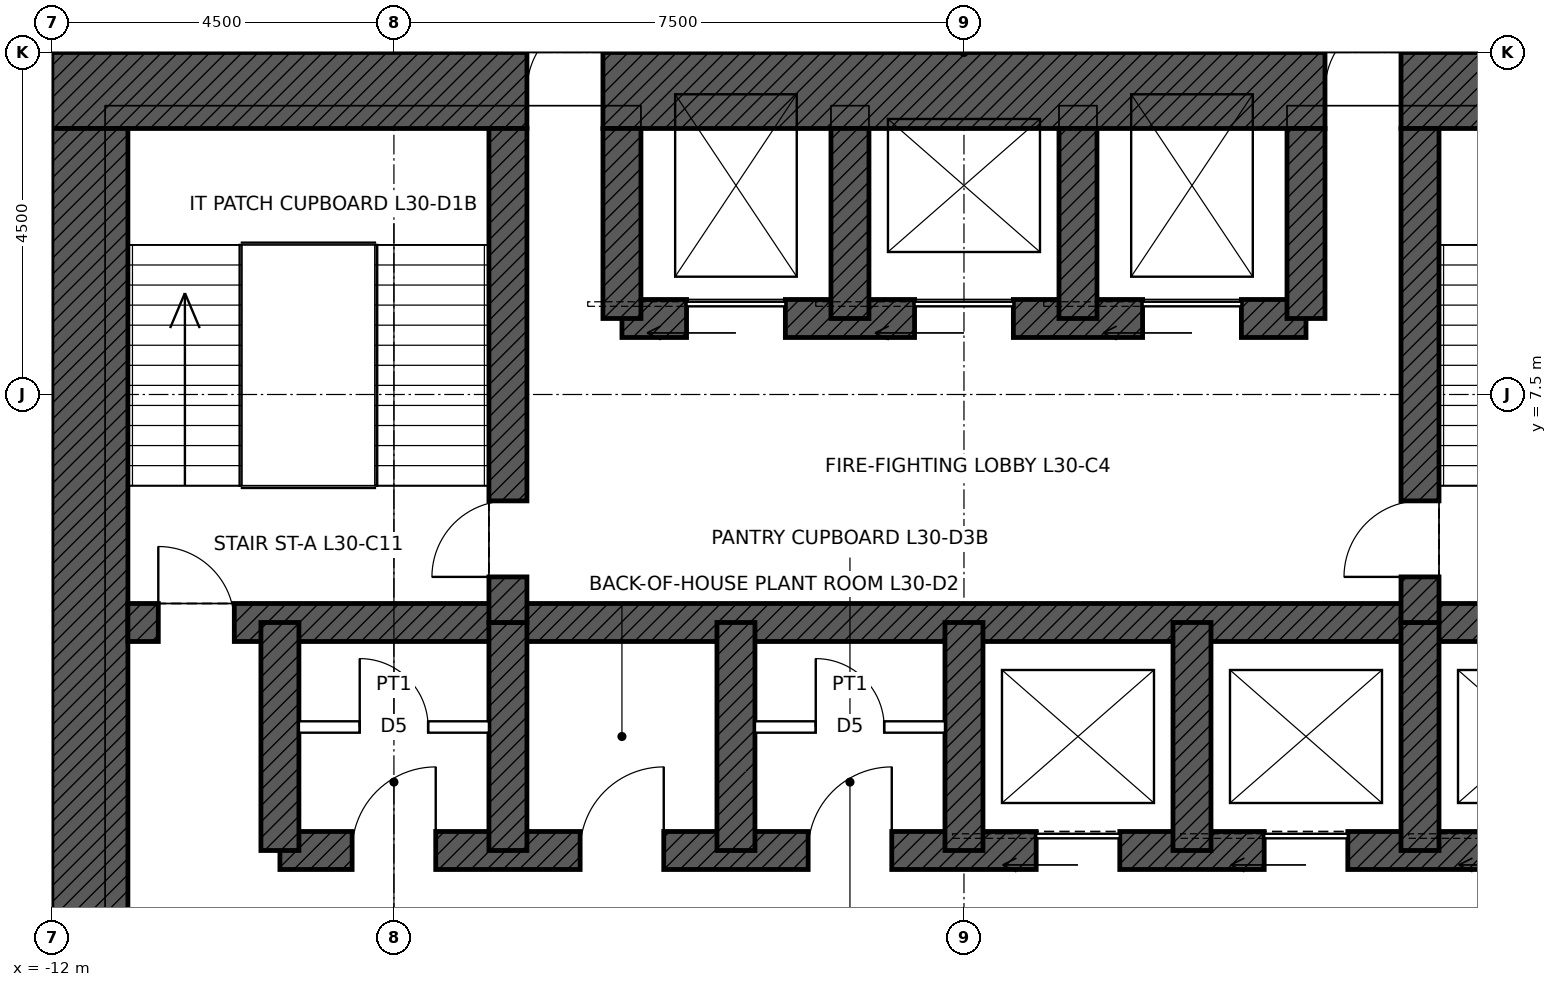
"""IFC4 building model, lengths in metres.
Left out: names, types, materials, properties, quantities, classifications, styles, units other than length and angle.
Written with IfcOpenShell. Run it as: python <this file> out.ifc"""

import sys

from ifc_helpers import new_model, si_unit, direction, frame, frame_2d, origin, place, context, subcontext, project, spatial, rectangle, extrude, element, fill, save


model = new_model("IFC4")
c1 = context("Model", 3, precision=1e-05, world=origin(), true_north=direction((0.0, 1.0)))
c2 = subcontext(c1, "Body", "Model", "MODEL_VIEW")
j1 = project(units=[si_unit("LENGTHUNIT", "METRE"), si_unit("PLANEANGLEUNIT", "RADIAN")], contexts=[c1])
p1 = place(None, origin())
s1 = spatial("IfcSite", under=j1, at=p1, CompositionType="ELEMENT")
p2 = place(p1, origin())
s2 = spatial("IfcBuilding", under=s1, at=p2, CompositionType="ELEMENT")
p3 = place(p2, frame((0.0, 0.0, 149.4)))
s3 = spatial("IfcBuildingStorey", under=s2, at=p3, CompositionType="ELEMENT", Elevation=149.4)
p4 = place(p3, frame((-12.0, 11.5, 0.0), z_axis=(0.0, 0.0, 1.0), x_axis=(1.0, 0.0, 0.0)))
e1 = element("IfcWall", 1, at=p4, inside=s3, PredefinedType="SHEAR", context=c2, shape_type="SweptSolid", body=[
    extrude(rectangle(XDim=24.0, YDim=1.0, at=frame_2d((12.0, 0.0))), origin(), (0.0, 0.0, 1.0), 4.5),
])
p5 = place(p4, frame((6.25, 0.0, 0.0)))
e2 = element("IfcOpeningElement", 2, at=p5, cuts=e1, PredefinedType="OPENING", context=c2, shape_type="SweptSolid", body=[
    extrude(rectangle(XDim=1.0, YDim=2.4, at=frame_2d((0.5, 1.2))), frame((0.0, 0.51, 0.0), z_axis=(0.0, -1.0, 0.0), x_axis=(1.0, 0.0, 0.0)), (0.0, 0.0, 1.0), 1.02),
])
p6 = place(p4, frame((16.75, 0.0, 0.0)))
e3 = element("IfcOpeningElement", 3, at=p6, cuts=e1, PredefinedType="OPENING", context=c2, shape_type="SweptSolid", body=[
    extrude(rectangle(XDim=1.0, YDim=2.4, at=frame_2d((0.5, 1.2))), frame((0.0, 0.51, 0.0), z_axis=(0.0, -1.0, 0.0), x_axis=(1.0, 0.0, 0.0)), (0.0, 0.0, 1.0), 1.02),
])
p7 = place(p3, frame((-11.5, -11.0, 0.0), z_axis=(0.0, 0.0, 1.0), x_axis=(0.0, 1.0, 0.0)))
e4 = element("IfcWall", 4, at=p7, inside=s3, PredefinedType="SHEAR", context=c2, shape_type="SweptSolid", body=[
    extrude(rectangle(XDim=22.0, YDim=1.0, at=frame_2d((11.0, 0.0))), origin(), (0.0, 0.0, 1.0), 4.5),
])
p8 = place(p7, frame((10.5, 0.0, 0.0)))
e5 = element("IfcOpeningElement", 5, at=p8, cuts=e4, PredefinedType="OPENING", context=c2, shape_type="SweptSolid", body=[
    extrude(rectangle(XDim=1.0, YDim=2.4, at=frame_2d((0.5, 1.2))), frame((0.0, 0.51, 0.0), z_axis=(0.0, -1.0, 0.0), x_axis=(1.0, 0.0, 0.0)), (0.0, 0.0, 1.0), 1.02),
])
p9 = place(p3, frame((-11.0, 4.5, 0.0), z_axis=(0.0, 0.0, 1.0), x_axis=(1.0, 0.0, 0.0)))
e6 = element("IfcWall", 6, at=p9, inside=s3, PredefinedType="SHEAR", context=c2, shape_type="SweptSolid", body=[
    extrude(rectangle(XDim=22.0, YDim=0.5, at=frame_2d((11.0, 0.0))), origin(), (0.0, 0.0, 1.0), 4.5),
])
p10 = place(p9, frame((0.4, 0.0, 0.0)))
e7 = element("IfcOpeningElement", 7, at=p10, cuts=e6, PredefinedType="OPENING", context=c2, shape_type="SweptSolid", body=[
    extrude(rectangle(XDim=1.0, YDim=2.1, at=frame_2d((0.5, 1.05))), frame((0.0, 0.26, 0.0), z_axis=(0.0, -1.0, 0.0), x_axis=(1.0, 0.0, 0.0)), (0.0, 0.0, 1.0), 0.52),
])
p11 = place(p9, frame((20.6, 0.0, 0.0)))
e8 = element("IfcOpeningElement", 8, at=p11, cuts=e6, PredefinedType="OPENING", context=c2, shape_type="SweptSolid", body=[
    extrude(rectangle(XDim=1.0, YDim=2.1, at=frame_2d((0.5, 1.05))), frame((0.0, 0.26, 0.0), z_axis=(0.0, -1.0, 0.0), x_axis=(1.0, 0.0, 0.0)), (0.0, 0.0, 1.0), 0.52),
])
p12 = place(p3, frame((-9.0, 1.5, 0.0), z_axis=(0.0, 0.0, 1.0), x_axis=(1.0, 0.0, 0.0)))
e9 = element("IfcWall", 9, at=p12, inside=s3, PredefinedType="SHEAR", context=c2, shape_type="SweptSolid", body=[
    extrude(rectangle(XDim=18.0, YDim=0.5, at=frame_2d((9.0, 0.0))), origin(), (0.0, 0.0, 1.0), 4.5),
])
p13 = place(p12, frame((9.95, 0.0, 0.0)))
e10 = element("IfcOpeningElement", 10, at=p13, cuts=e9, PredefinedType="OPENING", context=c2, shape_type="SweptSolid", body=[
    extrude(rectangle(XDim=1.1, YDim=2.1, at=frame_2d((0.55, 1.05))), frame((0.0, 0.26, 0.0), z_axis=(0.0, -1.0, 0.0), x_axis=(1.0, 0.0, 0.0)), (0.0, 0.0, 1.0), 0.52),
])
p14 = place(p12, frame((12.95, 0.0, 0.0)))
e11 = element("IfcOpeningElement", 11, at=p14, cuts=e9, PredefinedType="OPENING", context=c2, shape_type="SweptSolid", body=[
    extrude(rectangle(XDim=1.1, YDim=2.1, at=frame_2d((0.55, 1.05))), frame((0.0, 0.26, 0.0), z_axis=(0.0, -1.0, 0.0), x_axis=(1.0, 0.0, 0.0)), (0.0, 0.0, 1.0), 0.52),
])
p15 = place(p12, frame((15.95, 0.0, 0.0)))
e12 = element("IfcOpeningElement", 12, at=p15, cuts=e9, PredefinedType="OPENING", context=c2, shape_type="SweptSolid", body=[
    extrude(rectangle(XDim=1.1, YDim=2.1, at=frame_2d((0.55, 1.05))), frame((0.0, 0.26, 0.0), z_axis=(0.0, -1.0, 0.0), x_axis=(1.0, 0.0, 0.0)), (0.0, 0.0, 1.0), 0.52),
])
p16 = place(p12, frame((0.95, 0.0, 0.0)))
e13 = element("IfcOpeningElement", 13, at=p16, cuts=e9, PredefinedType="OPENING", context=c2, shape_type="SweptSolid", body=[
    extrude(rectangle(XDim=1.1, YDim=2.1, at=frame_2d((0.55, 1.05))), frame((0.0, 0.26, 0.0), z_axis=(0.0, -1.0, 0.0), x_axis=(1.0, 0.0, 0.0)), (0.0, 0.0, 1.0), 0.52),
])
p17 = place(p12, frame((3.95, 0.0, 0.0)))
e14 = element("IfcOpeningElement", 14, at=p17, cuts=e9, PredefinedType="OPENING", context=c2, shape_type="SweptSolid", body=[
    extrude(rectangle(XDim=1.1, YDim=2.1, at=frame_2d((0.55, 1.05))), frame((0.0, 0.26, 0.0), z_axis=(0.0, -1.0, 0.0), x_axis=(1.0, 0.0, 0.0)), (0.0, 0.0, 1.0), 0.52),
])
p18 = place(p12, frame((6.95, 0.0, 0.0)))
e15 = element("IfcOpeningElement", 15, at=p18, cuts=e9, PredefinedType="OPENING", context=c2, shape_type="SweptSolid", body=[
    extrude(rectangle(XDim=1.1, YDim=2.1, at=frame_2d((0.55, 1.05))), frame((0.0, 0.26, 0.0), z_axis=(0.0, -1.0, 0.0), x_axis=(1.0, 0.0, 0.0)), (0.0, 0.0, 1.0), 0.52),
])
p19 = place(p3, frame((-4.5, 8.5, 0.0), z_axis=(0.0, 0.0, 1.0), x_axis=(1.0, 0.0, 0.0)))
e16 = element("IfcWall", 16, at=p19, inside=s3, PredefinedType="SHEAR", context=c2, shape_type="SweptSolid", body=[
    extrude(rectangle(XDim=9.0, YDim=0.5, at=frame_2d((4.5, 0.0))), origin(), (0.0, 0.0, 1.0), 4.5),
])
p20 = place(p19, frame((0.85, 0.0, 0.0)))
e17 = element("IfcOpeningElement", 17, at=p20, cuts=e16, PredefinedType="OPENING", context=c2, shape_type="SweptSolid", body=[
    extrude(rectangle(XDim=1.3, YDim=2.4, at=frame_2d((0.65, 1.2))), frame((0.0, 0.26, 0.0), z_axis=(0.0, -1.0, 0.0), x_axis=(1.0, 0.0, 0.0)), (0.0, 0.0, 1.0), 0.52),
])
p21 = place(p19, frame((6.85, 0.0, 0.0)))
e18 = element("IfcOpeningElement", 18, at=p21, cuts=e16, PredefinedType="OPENING", context=c2, shape_type="SweptSolid", body=[
    extrude(rectangle(XDim=1.3, YDim=2.4, at=frame_2d((0.65, 1.2))), frame((0.0, 0.26, 0.0), z_axis=(0.0, -1.0, 0.0), x_axis=(1.0, 0.0, 0.0)), (0.0, 0.0, 1.0), 0.52),
])
p22 = place(p19, frame((3.85, 0.0, 0.0)))
e19 = element("IfcOpeningElement", 19, at=p22, cuts=e16, PredefinedType="OPENING", context=c2, shape_type="SweptSolid", body=[
    extrude(rectangle(XDim=1.3, YDim=2.4, at=frame_2d((0.65, 1.2))), frame((0.0, 0.26, 0.0), z_axis=(0.0, -1.0, 0.0), x_axis=(1.0, 0.0, 0.0)), (0.0, 0.0, 1.0), 0.52),
])
for number, where, z_axis, x_axis in (
    (20, (-9.0, 1.5, 0.0), (0.0, 0.0, 1.0), (0.0, 1.0, 0.0)),
    (21, (-6.0, 1.5, 0.0), (0.0, 0.0, 1.0), (0.0, 1.0, 0.0)),
    (22, (-3.0, 1.5, 0.0), (0.0, 0.0, 1.0), (0.0, 1.0, 0.0)),
    (23, (0.0, 1.5, 0.0), (0.0, 0.0, 1.0), (0.0, 1.0, 0.0)),
    (24, (3.0, 1.5, 0.0), (0.0, 0.0, 1.0), (0.0, 1.0, 0.0)),
    (25, (6.0, 1.5, 0.0), (0.0, 0.0, 1.0), (0.0, 1.0, 0.0)),
):
    element("IfcWall", number, at=place(p3, frame(where, z_axis=z_axis, x_axis=x_axis)), inside=s3, PredefinedType="SHEAR", context=c2, shape_type="SweptSolid", body=[
        extrude(rectangle(XDim=3.0, YDim=0.5, at=frame_2d((1.5, 0.0))), origin(), (0.0, 0.0, 1.0), 4.5),
    ])
p23 = place(p3, frame((-6.0, 4.5, 0.0), z_axis=(0.0, 0.0, 1.0), x_axis=(0.0, 1.0, 0.0)))
e26 = element("IfcWall", 26, at=p23, inside=s3, PredefinedType="SHEAR", context=c2, shape_type="SweptSolid", body=[
    extrude(rectangle(XDim=6.5, YDim=0.5, at=frame_2d((3.25, 0.0))), origin(), (0.0, 0.0, 1.0), 4.5),
])
p24 = place(p23, frame((0.6, 0.0, 0.0)))
e27 = element("IfcOpeningElement", 27, at=p24, cuts=e26, PredefinedType="OPENING", context=c2, shape_type="SweptSolid", body=[
    extrude(rectangle(XDim=1.0, YDim=2.1, at=frame_2d((0.5, 1.05))), frame((0.0, 0.26, 0.0), z_axis=(0.0, -1.0, 0.0), x_axis=(1.0, 0.0, 0.0)), (0.0, 0.0, 1.0), 0.52),
])
p25 = place(p3, frame((6.0, 4.5, 0.0), z_axis=(0.0, 0.0, 1.0), x_axis=(0.0, 1.0, 0.0)))
e28 = element("IfcWall", 28, at=p25, inside=s3, PredefinedType="SHEAR", context=c2, shape_type="SweptSolid", body=[
    extrude(rectangle(XDim=6.5, YDim=0.5, at=frame_2d((3.25, 0.0))), origin(), (0.0, 0.0, 1.0), 4.5),
])
p26 = place(p25, frame((0.6, 0.0, 0.0)))
e29 = element("IfcOpeningElement", 29, at=p26, cuts=e28, PredefinedType="OPENING", context=c2, shape_type="SweptSolid", body=[
    extrude(rectangle(XDim=1.0, YDim=2.1, at=frame_2d((0.5, 1.05))), frame((0.0, 0.26, 0.0), z_axis=(0.0, -1.0, 0.0), x_axis=(1.0, 0.0, 0.0)), (0.0, 0.0, 1.0), 0.52),
])
for number, where, z_axis, x_axis in (
    (30, (-4.5, 8.5, 0.0), (0.0, 0.0, 1.0), (0.0, 1.0, 0.0)),
    (31, (4.5, 8.5, 0.0), (0.0, 0.0, 1.0), (0.0, 1.0, 0.0)),
    (32, (-1.5, 8.5, 0.0), (0.0, 0.0, 1.0), (0.0, 1.0, 0.0)),
    (33, (1.5, 8.5, 0.0), (0.0, 0.0, 1.0), (0.0, 1.0, 0.0)),
):
    element("IfcWall", number, at=place(p3, frame(where, z_axis=z_axis, x_axis=x_axis)), inside=s3, PredefinedType="SHEAR", context=c2, shape_type="SweptSolid", body=[
        extrude(rectangle(XDim=2.5, YDim=0.5, at=frame_2d((1.25, 0.0))), origin(), (0.0, 0.0, 1.0), 4.5),
    ])
p27 = place(p3, frame((-14.075, 12.0, 0.0), z_axis=(0.0, 0.0, 1.0), x_axis=(1.0, 0.0, 0.0)))
e34 = element("IfcWall", 34, at=p27, inside=s3, PredefinedType="PARTITIONING", context=c2, shape_type="SweptSolid", body=[
    extrude(rectangle(XDim=2.075, YDim=0.15, at=frame_2d((1.038, 0.0))), origin(), (0.0, 0.0, 1.0), 4.3),
])
p28 = place(p27, frame((0.575, 0.0, 0.0)))
e35 = element("IfcOpeningElement", 35, at=p28, cuts=e34, PredefinedType="OPENING", context=c2, shape_type="SweptSolid", body=[
    extrude(rectangle(XDim=1.0, YDim=2.1, at=frame_2d((0.5, 1.05))), frame((0.0, 0.085, 0.0), z_axis=(0.0, -1.0, 0.0), x_axis=(1.0, 0.0, 0.0)), (0.0, 0.0, 1.0), 0.17),
])
p29 = place(p3, frame((-11.25, 12.0, 0.0), z_axis=(0.0, 0.0, 1.0), x_axis=(0.0, 1.0, 0.0)))
e36 = element("IfcWall", 36, at=p29, inside=s3, PredefinedType="PARTITIONING", context=c2, shape_type="SweptSolid", body=[
    extrude(rectangle(XDim=11.55, YDim=0.15, at=frame_2d((5.775, 0.0))), origin(), (0.0, 0.0, 1.0), 3.431),
])
p30 = place(p3, frame((0.0, 12.0, 0.0), z_axis=(0.0, 0.0, 1.0), x_axis=(0.0, 1.0, 0.0)))
e37 = element("IfcWall", 37, at=p30, inside=s3, PredefinedType="PARTITIONING", context=c2, shape_type="SweptSolid", body=[
    extrude(rectangle(XDim=10.39, YDim=0.15, at=frame_2d((5.195, 0.0))), origin(), (0.0, 0.0, 1.0), 3.431),
])
p31 = place(p3, frame((-8.75, 3.125, 0.0), z_axis=(0.0, 0.0, 1.0), x_axis=(1.0, 0.0, 0.0)))
e38 = element("IfcWall", 38, at=p31, inside=s3, PredefinedType="PARTITIONING", context=c2, shape_type="SweptSolid", body=[
    extrude(rectangle(XDim=2.5, YDim=0.15, at=frame_2d((1.25, 0.0))), origin(), (0.0, 0.0, 1.0), 4.25),
])
p32 = place(p31, frame((0.8, 0.0, 0.0)))
e39 = element("IfcOpeningElement", 39, at=p32, cuts=e38, PredefinedType="OPENING", context=c2, shape_type="SweptSolid", body=[
    extrude(rectangle(XDim=0.9, YDim=2.1, at=frame_2d((0.45, 1.05))), frame((0.0, 0.085, 0.0), z_axis=(0.0, -1.0, 0.0), x_axis=(1.0, 0.0, 0.0)), (0.0, 0.0, 1.0), 0.17),
])
p33 = place(p3, frame((-2.75, 3.125, 0.0), z_axis=(0.0, 0.0, 1.0), x_axis=(1.0, 0.0, 0.0)))
e40 = element("IfcWall", 40, at=p33, inside=s3, PredefinedType="PARTITIONING", context=c2, shape_type="SweptSolid", body=[
    extrude(rectangle(XDim=2.5, YDim=0.15, at=frame_2d((1.25, 0.0))), origin(), (0.0, 0.0, 1.0), 4.25),
])
p34 = place(p33, frame((0.8, 0.0, 0.0)))
e41 = element("IfcOpeningElement", 41, at=p34, cuts=e40, PredefinedType="OPENING", context=c2, shape_type="SweptSolid", body=[
    extrude(rectangle(XDim=0.9, YDim=2.1, at=frame_2d((0.45, 1.05))), frame((0.0, 0.085, 0.0), z_axis=(0.0, -1.0, 0.0), x_axis=(1.0, 0.0, 0.0)), (0.0, 0.0, 1.0), 0.17),
])
p35 = place(p10, origin())
e42 = element("IfcDoor", 42, at=p35, inside=s3, OperationType="SINGLE_SWING_LEFT", PredefinedType="DOOR", context=c2, shape_type="SweptSolid", body=[
    extrude(rectangle(XDim=1.0, YDim=2.1, at=frame_2d((0.5, 1.05))), frame((0.0, 0.025, 0.0), z_axis=(0.0, -1.0, 0.0), x_axis=(1.0, 0.0, 0.0)), (0.0, 0.0, 1.0), 0.05),
])
fill(e7, e42)
p36 = place(p24, origin())
e43 = element("IfcDoor", 43, at=p36, inside=s3, OperationType="SINGLE_SWING_LEFT", PredefinedType="DOOR", context=c2, shape_type="SweptSolid", body=[
    extrude(rectangle(XDim=1.0, YDim=2.1, at=frame_2d((0.5, 1.05))), frame((0.0, 0.025, 0.0), z_axis=(0.0, -1.0, 0.0), x_axis=(1.0, 0.0, 0.0)), (0.0, 0.0, 1.0), 0.05),
])
fill(e27, e43)
p37 = place(p26, origin())
e44 = element("IfcDoor", 44, at=p37, inside=s3, OperationType="SINGLE_SWING_LEFT", PredefinedType="DOOR", context=c2, shape_type="SweptSolid", body=[
    extrude(rectangle(XDim=1.0, YDim=2.1, at=frame_2d((0.5, 1.05))), frame((0.0, 0.025, 0.0), z_axis=(0.0, -1.0, 0.0), x_axis=(1.0, 0.0, 0.0)), (0.0, 0.0, 1.0), 0.05),
])
fill(e29, e44)
p38 = place(p5, origin())
e45 = element("IfcDoor", 45, at=p38, inside=s3, OperationType="SINGLE_SWING_RIGHT", PredefinedType="DOOR", context=c2, shape_type="SweptSolid", body=[
    extrude(rectangle(XDim=1.0, YDim=2.4, at=frame_2d((0.5, 1.2))), frame((0.0, 0.485, 0.0), z_axis=(0.0, -1.0, 0.0), x_axis=(1.0, 0.0, 0.0)), (0.0, 0.0, 1.0), 0.05),
])
fill(e2, e45)
p39 = place(p6, origin())
e46 = element("IfcDoor", 46, at=p39, inside=s3, OperationType="SINGLE_SWING_RIGHT", PredefinedType="DOOR", context=c2, shape_type="SweptSolid", body=[
    extrude(rectangle(XDim=1.0, YDim=2.4, at=frame_2d((0.5, 1.2))), frame((0.0, 0.485, 0.0), z_axis=(0.0, -1.0, 0.0), x_axis=(1.0, 0.0, 0.0)), (0.0, 0.0, 1.0), 0.05),
])
fill(e3, e46)
p40 = place(p20, origin())
e47 = element("IfcDoor", 47, at=p40, inside=s3, OperationType="SLIDING_TO_LEFT", PredefinedType="DOOR", context=c2, shape_type="SweptSolid", body=[
    extrude(rectangle(XDim=1.3, YDim=2.4, at=frame_2d((0.65, 1.2))), frame((0.0, 0.025, 0.0), z_axis=(0.0, -1.0, 0.0), x_axis=(1.0, 0.0, 0.0)), (0.0, 0.0, 1.0), 0.05),
])
fill(e17, e47)
p41 = place(p21, origin())
e48 = element("IfcDoor", 48, at=p41, inside=s3, OperationType="SLIDING_TO_LEFT", PredefinedType="DOOR", context=c2, shape_type="SweptSolid", body=[
    extrude(rectangle(XDim=1.3, YDim=2.4, at=frame_2d((0.65, 1.2))), frame((0.0, 0.025, 0.0), z_axis=(0.0, -1.0, 0.0), x_axis=(1.0, 0.0, 0.0)), (0.0, 0.0, 1.0), 0.05),
])
fill(e18, e48)
p42 = place(p22, origin())
e49 = element("IfcDoor", 49, at=p42, inside=s3, OperationType="SLIDING_TO_LEFT", PredefinedType="DOOR", context=c2, shape_type="SweptSolid", body=[
    extrude(rectangle(XDim=1.3, YDim=2.4, at=frame_2d((0.65, 1.2))), frame((0.0, 0.025, 0.0), z_axis=(0.0, -1.0, 0.0), x_axis=(1.0, 0.0, 0.0)), (0.0, 0.0, 1.0), 0.05),
])
fill(e19, e49)
p43 = place(p13, origin())
e50 = element("IfcDoor", 50, at=p43, inside=s3, OperationType="SLIDING_TO_LEFT", PredefinedType="DOOR", context=c2, shape_type="SweptSolid", body=[
    extrude(rectangle(XDim=1.1, YDim=2.1, at=frame_2d((0.55, 1.05))), frame((0.0, 0.025, 0.0), z_axis=(0.0, -1.0, 0.0), x_axis=(1.0, 0.0, 0.0)), (0.0, 0.0, 1.0), 0.05),
])
fill(e10, e50)
p44 = place(p14, origin())
e51 = element("IfcDoor", 51, at=p44, inside=s3, OperationType="SLIDING_TO_LEFT", PredefinedType="DOOR", context=c2, shape_type="SweptSolid", body=[
    extrude(rectangle(XDim=1.1, YDim=2.1, at=frame_2d((0.55, 1.05))), frame((0.0, 0.025, 0.0), z_axis=(0.0, -1.0, 0.0), x_axis=(1.0, 0.0, 0.0)), (0.0, 0.0, 1.0), 0.05),
])
fill(e11, e51)
p45 = place(p16, origin())
e52 = element("IfcDoor", 52, at=p45, inside=s3, OperationType="SINGLE_SWING_RIGHT", PredefinedType="DOOR", context=c2, shape_type="SweptSolid", body=[
    extrude(rectangle(XDim=1.1, YDim=2.1, at=frame_2d((0.55, 1.05))), frame((0.0, 0.025, 0.0), z_axis=(0.0, -1.0, 0.0), x_axis=(1.0, 0.0, 0.0)), (0.0, 0.0, 1.0), 0.05),
])
fill(e13, e52)
p46 = place(p32, origin())
e53 = element("IfcDoor", 53, at=p46, inside=s3, OperationType="SINGLE_SWING_LEFT", PredefinedType="DOOR", context=c2, shape_type="SweptSolid", body=[
    extrude(rectangle(XDim=0.9, YDim=2.1, at=frame_2d((0.45, 1.05))), frame((0.0, 0.025, 0.0), z_axis=(0.0, -1.0, 0.0), x_axis=(1.0, 0.0, 0.0)), (0.0, 0.0, 1.0), 0.05),
])
fill(e39, e53)
p47 = place(p17, origin())
e54 = element("IfcDoor", 54, at=p47, inside=s3, OperationType="SINGLE_SWING_RIGHT", PredefinedType="DOOR", context=c2, shape_type="SweptSolid", body=[
    extrude(rectangle(XDim=1.1, YDim=2.1, at=frame_2d((0.55, 1.05))), frame((0.0, 0.025, 0.0), z_axis=(0.0, -1.0, 0.0), x_axis=(1.0, 0.0, 0.0)), (0.0, 0.0, 1.0), 0.05),
])
fill(e14, e54)
p48 = place(p18, origin())
e55 = element("IfcDoor", 55, at=p48, inside=s3, OperationType="SINGLE_SWING_RIGHT", PredefinedType="DOOR", context=c2, shape_type="SweptSolid", body=[
    extrude(rectangle(XDim=1.1, YDim=2.1, at=frame_2d((0.55, 1.05))), frame((0.0, 0.025, 0.0), z_axis=(0.0, -1.0, 0.0), x_axis=(1.0, 0.0, 0.0)), (0.0, 0.0, 1.0), 0.05),
])
fill(e15, e55)
p49 = place(p34, origin())
e56 = element("IfcDoor", 56, at=p49, inside=s3, OperationType="SINGLE_SWING_LEFT", PredefinedType="DOOR", context=c2, shape_type="SweptSolid", body=[
    extrude(rectangle(XDim=0.9, YDim=2.1, at=frame_2d((0.45, 1.05))), frame((0.0, 0.025, 0.0), z_axis=(0.0, -1.0, 0.0), x_axis=(1.0, 0.0, 0.0)), (0.0, 0.0, 1.0), 0.05),
])
fill(e41, e56)
save(model, sys.argv[1])
